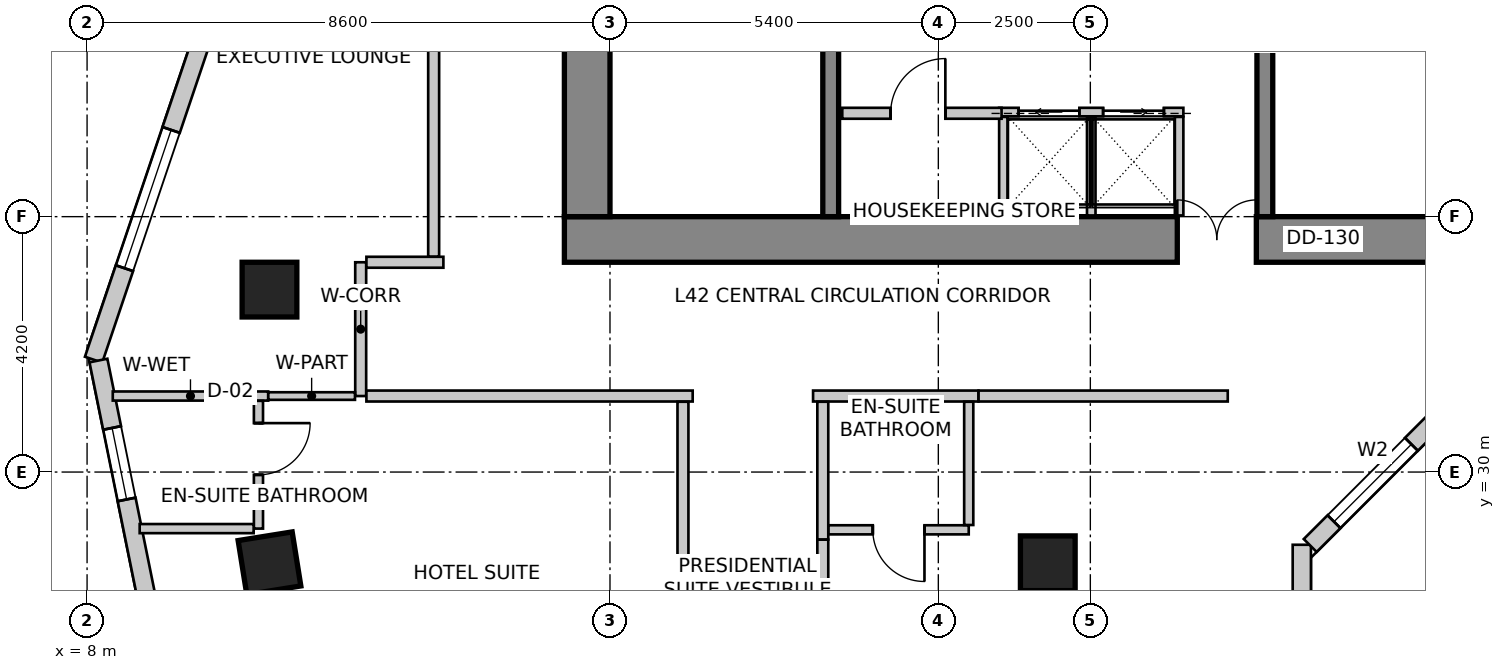
"""IFC4 building model, lengths in metres.
Left out: names, types, materials, properties, quantities, classifications, styles, units other than length and angle.
Written with IfcOpenShell. Run it as: python <this file> out.ifc"""

import sys

from ifc_helpers import new_model, si_unit, direction, frame, frame_2d, origin, origin_2d, place, context, subcontext, project, spatial, rectangle, extrude, source, transform, mapped, element, fill, save


model = new_model("IFC4")
c1 = context("Model", 3, precision=1e-05, world=origin(), true_north=direction((0.0, 1.0)))
c2 = subcontext(c1, "Body", "Model", "MODEL_VIEW")
j1 = project(units=[si_unit("LENGTHUNIT", "METRE"), si_unit("PLANEANGLEUNIT", "RADIAN")], contexts=[c1])
p1 = place(None, origin())
s1 = spatial("IfcSite", under=j1, at=p1, CompositionType="ELEMENT")
p2 = place(p1, origin())
s2 = spatial("IfcBuilding", under=s1, at=p2, CompositionType="ELEMENT")
p3 = place(p2, frame((0.0, 0.0, 168.2)))
s3 = spatial("IfcBuildingStorey", under=s2, at=p3, CompositionType="ELEMENT", Elevation=168.2)
p4 = place(p3, frame((15.85, 33.825, 0.0), z_axis=(0.0, 0.0, 1.0), x_axis=(1.0, 0.0, 0.0)))
e1 = element("IfcWall", 1, at=p4, inside=s3, PredefinedType="SHEAR", context=c2, shape_type="SweptSolid", body=[
    extrude(rectangle(XDim=15.9, YDim=0.75, at=frame_2d((7.95, 0.0))), origin(), (0.0, 0.0, 1.0), 3.6),
])
m1 = source(origin(), c2, "Body", "SweptSolid", [
    extrude(rectangle(XDim=1.3, YDim=2.15, at=frame_2d((0.65, 1.075))), frame((0.0, 0.385, 0.0), z_axis=(0.0, -1.0, 0.0), x_axis=(1.0, 0.0, 0.0)), (0.0, 0.0, 1.0), 0.77),
])
p5 = place(p4, frame((10.08, 0.0, 0.0)))
e2 = element("IfcOpeningElement", 2, at=p5, cuts=e1, PredefinedType="OPENING", context=c2, shape_type="MappedRepresentation", body=[
    mapped(m1, transform((0.0, 0.0, 0.0), scale=1.0)),
])
p6 = place(p3, frame((16.225, 34.2, 0.0), z_axis=(0.0, 0.0, 1.0), x_axis=(0.0, 1.0, 0.0)))
e3 = element("IfcWall", 3, at=p6, inside=s3, PredefinedType="SHEAR", context=c2, shape_type="SweptSolid", body=[
    extrude(rectangle(XDim=11.4, YDim=0.75, at=frame_2d((5.7, 0.0))), origin(), (0.0, 0.0, 1.0), 3.6),
])
m2 = source(origin(), c2, "Body", "SweptSolid", [
    extrude(rectangle(XDim=1.1, YDim=2.15, at=frame_2d((0.55, 1.075))), frame((0.0, 0.385, 0.0), z_axis=(0.0, -1.0, 0.0), x_axis=(1.0, 0.0, 0.0)), (0.0, 0.0, 1.0), 0.77),
])
p7 = place(p6, frame((7.15, 0.0, 0.0)))
e4 = element("IfcOpeningElement", 4, at=p7, cuts=e3, PredefinedType="OPENING", context=c2, shape_type="MappedRepresentation", body=[
    mapped(m2, transform((0.0, 0.0, 0.0), scale=1.0)),
])
p8 = place(p3, frame((20.23, 34.2, 0.0), z_axis=(0.0, 0.0, 1.0), x_axis=(0.0, 1.0, 0.0)))
e5 = element("IfcWall", 5, at=p8, inside=s3, PredefinedType="SHEAR", context=c2, shape_type="SweptSolid", body=[
    extrude(rectangle(XDim=9.06, YDim=0.26, at=frame_2d((4.53, 0.0))), origin(), (0.0, 0.0, 1.0), 3.6),
])
m3 = source(origin(), c2, "Body", "SweptSolid", [
    extrude(rectangle(XDim=1.1, YDim=2.15, at=frame_2d((0.55, 1.075))), frame((0.0, 0.14, 0.0), z_axis=(0.0, -1.0, 0.0), x_axis=(1.0, 0.0, 0.0)), (0.0, 0.0, 1.0), 0.28),
])
p9 = place(p8, frame((7.45, 0.0, 0.0)))
e6 = element("IfcOpeningElement", 6, at=p9, cuts=e5, PredefinedType="OPENING", context=c2, shape_type="MappedRepresentation", body=[
    mapped(m3, transform((0.0, 0.0, 0.0), scale=1.0)),
])
p10 = place(p3, frame((27.37, 34.2, 0.0), z_axis=(0.0, 0.0, 1.0), x_axis=(0.0, 1.0, 0.0)))
e7 = element("IfcWall", 7, at=p10, inside=s3, PredefinedType="SHEAR", context=c2, shape_type="SweptSolid", body=[
    extrude(rectangle(XDim=9.06, YDim=0.26, at=frame_2d((4.53, 0.0))), origin(), (0.0, 0.0, 1.0), 3.6),
])
p11 = place(p10, frame((7.45, 0.0, 0.0)))
e8 = element("IfcOpeningElement", 8, at=p11, cuts=e7, PredefinedType="OPENING", context=c2, shape_type="MappedRepresentation", body=[
    mapped(m3, transform((0.0, 0.0, 0.0), scale=1.0)),
])
m4 = source(origin(), c2, "Body", "SweptSolid", [
    extrude(rectangle(XDim=0.9, YDim=0.9, at=origin_2d()), origin(), (0.0, 0.0, 1.0), 3.6),
])
for number, where, z_axis, x_axis in (
    (9, (11.0, 33.0, 0.0), (0.0, 0.0, 1.0), (1.0, 0.0, 0.0)),
    (10, (11.0, 28.5, 0.0), (0.0, 0.0, 1.0), (0.158, -0.987, 0.0)),
    (11, (23.8, 28.5, 0.0), (0.0, 0.0, 1.0), (1.0, 0.0, 0.0)),
):
    element("IfcColumn", number, at=place(p3, frame(where, z_axis=z_axis, x_axis=x_axis)), inside=s3, PredefinedType="COLUMN", context=c2, shape_type="MappedRepresentation", body=[
        mapped(m4, transform((0.0, 0.0, 0.0), scale=1.0)),
    ])
p12 = place(p3, frame((27.978, 27.577, 0.0), z_axis=(0.0, 0.0, 1.0), x_axis=(0.0, 1.0, 0.0)))
e12 = element("IfcWall", 12, at=p12, inside=s3, PredefinedType="SOLIDWALL", context=c2, shape_type="SweptSolid", body=[
    extrude(rectangle(XDim=1.228, YDim=0.3, at=frame_2d((0.614, 0.0))), origin(), (0.0, 0.0, 1.0), 3.3),
])
p13 = place(p3, frame((28.116, 28.792, 0.0), z_axis=(0.0, 0.0, 1.0), x_axis=(0.707064797706, 0.707148762175, 0.0)))
e13 = element("IfcWall", 13, at=p13, inside=s3, PredefinedType="SOLIDWALL", context=c2, shape_type="SweptSolid", body=[
    extrude(rectangle(XDim=2.908, YDim=0.3, at=frame_2d((1.454, 0.0))), origin(), (0.0, 0.0, 1.0), 3.3),
])
m5 = source(origin(), c2, "Body", "SweptSolid", [
    extrude(rectangle(XDim=1.8, YDim=2.1, at=frame_2d((0.9, 1.05))), frame((0.0, 0.16, 0.0), z_axis=(0.0, -1.0, 0.0), x_axis=(1.0, 0.0, 0.0)), (0.0, 0.0, 1.0), 0.32),
])
p14 = place(p13, frame((0.554, 0.0, 0.85)))
e14 = element("IfcOpeningElement", 14, at=p14, cuts=e13, PredefinedType="OPENING", context=c2, shape_type="MappedRepresentation", body=[
    mapped(m5, transform((0.0, 0.0, 0.0), scale=1.0)),
])
p15 = place(p3, frame((13.269, 47.134, 0.0), z_axis=(0.0, 0.0, 1.0), x_axis=(-0.319929773322, -0.947441259468, 0.0)))
e15 = element("IfcWall", 15, at=p15, inside=s3, PredefinedType="SOLIDWALL", context=c2, shape_type="SweptSolid", body=[
    extrude(rectangle(XDim=16.134, YDim=0.3, at=frame_2d((8.067, 0.0))), origin(), (0.0, 0.0, 1.0), 3.3),
])
m6 = source(origin(), c2, "Body", "SweptSolid", [
    extrude(rectangle(XDim=2.4, YDim=2.2, at=frame_2d((1.2, 1.1))), frame((0.0, 0.16, 0.0), z_axis=(0.0, -1.0, 0.0), x_axis=(1.0, 0.0, 0.0)), (0.0, 0.0, 1.0), 0.32),
])
p16 = place(p15, frame((2.276, 0.0, 0.85)))
e16 = element("IfcOpeningElement", 16, at=p16, cuts=e15, PredefinedType="OPENING", context=c2, shape_type="MappedRepresentation", body=[
    mapped(m6, transform((0.0, 0.0, 0.0), scale=1.0)),
])
m7 = source(origin(), c2, "Body", "SweptSolid", [
    extrude(rectangle(XDim=2.1, YDim=2.0, at=frame_2d((1.05, 1.0))), frame((0.0, 0.16, 0.0), z_axis=(0.0, -1.0, 0.0), x_axis=(1.0, 0.0, 0.0)), (0.0, 0.0, 1.0), 0.32),
])
p17 = place(p15, frame((7.361, 0.0, 0.85)))
e17 = element("IfcOpeningElement", 17, at=p17, cuts=e15, PredefinedType="OPENING", context=c2, shape_type="MappedRepresentation", body=[
    mapped(m7, transform((0.0, 0.0, 0.0), scale=1.0)),
])
p18 = place(p15, frame((12.146, 0.0, 0.85)))
e18 = element("IfcOpeningElement", 18, at=p18, cuts=e15, PredefinedType="OPENING", context=c2, shape_type="MappedRepresentation", body=[
    mapped(m6, transform((0.0, 0.0, 0.0), scale=1.0)),
])
p19 = place(p3, frame((8.187, 31.834, 0.0), z_axis=(0.0, 0.0, 1.0), x_axis=(0.198869838988, -0.980025911464, 0.0)))
e19 = element("IfcWall", 19, at=p19, inside=s3, PredefinedType="SOLIDWALL", context=c2, shape_type="SweptSolid", body=[
    extrude(rectangle(XDim=16.363, YDim=0.3, at=frame_2d((8.182, 0.0))), origin(), (0.0, 0.0, 1.0), 3.3),
])
m8 = source(origin(), c2, "Body", "SweptSolid", [
    extrude(rectangle(XDim=1.2, YDim=1.6, at=frame_2d((0.6, 0.8))), frame((0.0, 0.16, 0.0), z_axis=(0.0, -1.0, 0.0), x_axis=(1.0, 0.0, 0.0)), (0.0, 0.0, 1.0), 0.32),
])
p20 = place(p19, frame((1.131, 0.0, 0.85)))
e20 = element("IfcOpeningElement", 20, at=p20, cuts=e19, PredefinedType="OPENING", context=c2, shape_type="MappedRepresentation", body=[
    mapped(m8, transform((0.0, 0.0, 0.0), scale=1.0)),
])
p21 = place(p19, frame((4.345, 0.0, 0.85)))
e21 = element("IfcOpeningElement", 21, at=p21, cuts=e19, PredefinedType="OPENING", context=c2, shape_type="MappedRepresentation", body=[
    mapped(m7, transform((0.0, 0.0, 0.0), scale=1.0)),
])
p22 = place(p19, frame((8.857, 0.0, 0.85)))
e22 = element("IfcOpeningElement", 22, at=p22, cuts=e19, PredefinedType="OPENING", context=c2, shape_type="MappedRepresentation", body=[
    mapped(m6, transform((0.0, 0.0, 0.0), scale=1.0)),
])
p23 = place(p19, frame((13.386, 0.0, 0.85)))
e23 = element("IfcOpeningElement", 23, at=p23, cuts=e19, PredefinedType="OPENING", context=c2, shape_type="MappedRepresentation", body=[
    mapped(m7, transform((0.0, 0.0, 0.0), scale=1.0)),
])
p24 = place(p3, frame((23.0, 35.92, 0.0), z_axis=(0.0, 0.0, 1.0), x_axis=(1.0, 0.0, 0.0)))
e24 = element("IfcWall", 24, at=p24, inside=s3, PredefinedType="SOLIDWALL", context=c2, shape_type="SweptSolid", body=[
    extrude(rectangle(XDim=3.03, YDim=0.14, at=frame_2d((1.515, 0.0))), origin(), (0.0, 0.0, 1.0), 3.3),
])
m9 = source(origin(), c2, "Body", "SweptSolid", [
    extrude(rectangle(XDim=1.0, YDim=2.15, at=frame_2d((0.5, 1.075))), frame((0.0, 0.08, 0.0), z_axis=(0.0, -1.0, 0.0), x_axis=(1.0, 0.0, 0.0)), (0.0, 0.0, 1.0), 0.16),
])
p25 = place(p24, frame((0.32, 0.0, 0.0)))
e25 = element("IfcOpeningElement", 25, at=p25, cuts=e24, PredefinedType="OPENING", context=c2, shape_type="MappedRepresentation", body=[
    mapped(m9, transform((0.0, 0.0, 0.0), scale=1.0)),
])
p26 = place(p24, frame((1.71, 0.0, 0.0)))
e26 = element("IfcOpeningElement", 26, at=p26, cuts=e24, PredefinedType="OPENING", context=c2, shape_type="MappedRepresentation", body=[
    mapped(m9, transform((0.0, 0.0, 0.0), scale=1.0)),
])
for number, where, z_axis, x_axis in (
    (27, (25.96, 34.22, 0.0), (0.0, 0.0, 1.0), (0.0, 1.0, 0.0)),
    (28, (23.07, 34.22, 0.0), (0.0, 0.0, 1.0), (0.0, 1.0, 0.0)),
    (29, (24.515, 34.22, 0.0), (0.0, 0.0, 1.0), (0.0, 1.0, 0.0)),
):
    element("IfcWall", number, at=place(p3, frame(where, z_axis=z_axis, x_axis=x_axis)), inside=s3, PredefinedType="SOLIDWALL", context=c2, shape_type="SweptSolid", body=[
        extrude(rectangle(XDim=1.62, YDim=0.14, at=frame_2d((0.81, 0.0))), origin(), (0.0, 0.0, 1.0), 2.592),
    ])
p27 = place(p3, frame((20.42, 35.9, 0.0), z_axis=(0.0, 0.0, 1.0), x_axis=(1.0, 0.0, 0.0)))
e30 = element("IfcWall", 30, at=p27, inside=s3, PredefinedType="PARTITIONING", context=c2, shape_type="SweptSolid", body=[
    extrude(rectangle(XDim=2.62, YDim=0.18, at=frame_2d((1.31, 0.0))), origin(), (0.0, 0.0, 1.0), 3.3),
])
m10 = source(origin(), c2, "Body", "SweptSolid", [
    extrude(rectangle(XDim=0.9, YDim=2.15, at=frame_2d((0.45, 1.075))), frame((0.0, 0.1, 0.0), z_axis=(0.0, -1.0, 0.0), x_axis=(1.0, 0.0, 0.0)), (0.0, 0.0, 1.0), 0.2),
])
p28 = place(p27, frame((0.796, 0.0, 0.0)))
e31 = element("IfcOpeningElement", 31, at=p28, cuts=e30, PredefinedType="OPENING", context=c2, shape_type="MappedRepresentation", body=[
    mapped(m10, transform((0.0, 0.0, 0.0), scale=1.0)),
])
p29 = place(p3, frame((12.5, 31.25, 0.0), z_axis=(0.0, 0.0, 1.0), x_axis=(0.0, 1.0, 0.0)))
e32 = element("IfcWall", 32, at=p29, inside=s3, PredefinedType="PARTITIONING", context=c2, shape_type="SweptSolid", body=[
    extrude(rectangle(XDim=2.2, YDim=0.18, at=frame_2d((1.1, 0.0))), origin(), (0.0, 0.0, 1.0), 2.885),
])
p30 = place(p3, frame((12.594, 33.45, 0.0), z_axis=(0.0, 0.0, 1.0), x_axis=(1.0, 0.0, 0.0)))
e33 = element("IfcWall", 33, at=p30, inside=s3, PredefinedType="PARTITIONING", context=c2, shape_type="SweptSolid", body=[
    extrude(rectangle(XDim=1.266, YDim=0.18, at=frame_2d((0.633, 0.0))), origin(), (0.0, 0.0, 1.0), 3.3),
])
p31 = place(p3, frame((17.96, 31.25, 0.0), z_axis=(0.0, 0.0, 1.0), x_axis=(-1.0, 0.0, 0.0)))
e34 = element("IfcWall", 34, at=p31, inside=s3, PredefinedType="PARTITIONING", context=c2, shape_type="SweptSolid", body=[
    extrude(rectangle(XDim=5.366, YDim=0.18, at=frame_2d((2.683, 0.0))), origin(), (0.0, 0.0, 1.0), 2.885),
])
p32 = place(p3, frame((22.66, 31.25, 0.0), z_axis=(0.0, 0.0, 1.0), x_axis=(-1.0, 0.0, 0.0)))
e35 = element("IfcWall", 35, at=p32, inside=s3, PredefinedType="PARTITIONING", context=c2, shape_type="SweptSolid", body=[
    extrude(rectangle(XDim=2.72, YDim=0.18, at=frame_2d((1.36, 0.0))), origin(), (0.0, 0.0, 1.0), 2.885),
])
p33 = place(p3, frame((26.76, 31.25, 0.0), z_axis=(0.0, 0.0, 1.0), x_axis=(-1.0, 0.0, 0.0)))
e36 = element("IfcWall", 36, at=p33, inside=s3, PredefinedType="PARTITIONING", context=c2, shape_type="SweptSolid", body=[
    extrude(rectangle(XDim=4.098, YDim=0.18, at=frame_2d((2.049, 0.0))), origin(), (0.0, 0.0, 1.0), 3.3),
])
p34 = place(p3, frame((13.7, 33.544, 0.0), z_axis=(0.0, 0.0, 1.0), x_axis=(0.0, 1.0, 0.0)))
e37 = element("IfcWall", 37, at=p34, inside=s3, PredefinedType="PARTITIONING", context=c2, shape_type="SweptSolid", body=[
    extrude(rectangle(XDim=13.86, YDim=0.18, at=frame_2d((6.93, 0.0))), origin(), (0.0, 0.0, 1.0), 2.442),
])
p35 = place(p34, frame((4.253, 0.0, 0.0)))
e38 = element("IfcOpeningElement", 38, at=p35, cuts=e37, PredefinedType="OPENING", context=c2, shape_type="MappedRepresentation", body=[
    mapped(m10, transform((0.0, 0.0, 0.0), scale=1.0)),
])
p36 = place(p3, frame((10.979, 31.25, 0.0), z_axis=(0.0, 0.0, 1.0), x_axis=(-1.0, 0.0, 0.0)))
e39 = element("IfcWall", 39, at=p36, inside=s3, PredefinedType="PARTITIONING", context=c2, shape_type="SweptSolid", body=[
    extrude(rectangle(XDim=2.556, YDim=0.15, at=frame_2d((1.278, 0.0))), origin(), (0.0, 0.0, 1.0), 2.442),
])
p37 = place(p3, frame((12.406, 31.25, 0.0), z_axis=(0.0, 0.0, 1.0), x_axis=(-1.0, 0.0, 0.0)))
e40 = element("IfcWall", 40, at=p37, inside=s3, PredefinedType="PARTITIONING", context=c2, shape_type="SweptSolid", body=[
    extrude(rectangle(XDim=1.426, YDim=0.125, at=frame_2d((0.713, 0.0))), origin(), (0.0, 0.0, 1.0), 2.442),
])
p38 = place(p3, frame((17.8, 19.5, 0.0), z_axis=(0.0, 0.0, 1.0), x_axis=(0.0, 1.0, 0.0)))
e41 = element("IfcWall", 41, at=p38, inside=s3, PredefinedType="PARTITIONING", context=c2, shape_type="SweptSolid", body=[
    extrude(rectangle(XDim=11.656, YDim=0.18, at=frame_2d((5.828, 0.0))), origin(), (0.0, 0.0, 1.0), 2.738),
])
p39 = place(p38, frame((5.378, 0.0, 0.0)))
e42 = element("IfcOpeningElement", 42, at=p39, cuts=e41, PredefinedType="OPENING", context=c2, shape_type="MappedRepresentation", body=[
    mapped(m10, transform((0.0, 0.0, 0.0), scale=1.0)),
])
p40 = place(p3, frame((20.1, 31.156, 0.0), z_axis=(0.0, 0.0, 1.0), x_axis=(0.0, -1.0, 0.0)))
e43 = element("IfcWall", 43, at=p40, inside=s3, PredefinedType="PARTITIONING", context=c2, shape_type="SweptSolid", body=[
    extrude(rectangle(XDim=2.266, YDim=0.18, at=frame_2d((1.133, 0.0))), origin(), (0.0, 0.0, 1.0), 2.885),
])
p41 = place(p3, frame((20.1, 28.888, 0.0), z_axis=(0.0, 0.0, 1.0), x_axis=(0.0, -1.0, 0.0)))
e44 = element("IfcWall", 44, at=p41, inside=s3, PredefinedType="PARTITIONING", context=c2, shape_type="SweptSolid", body=[
    extrude(rectangle(XDim=9.388, YDim=0.18, at=frame_2d((4.694, 0.0))), origin(), (0.0, 0.0, 1.0), 2.738),
])
p42 = place(p41, frame((4.244, 0.0, 0.0)))
e45 = element("IfcOpeningElement", 45, at=p42, cuts=e44, PredefinedType="OPENING", context=c2, shape_type="MappedRepresentation", body=[
    mapped(m10, transform((0.0, 0.0, 0.0), scale=1.0)),
])
p43 = place(p3, frame((10.819, 31.171, 0.0), z_axis=(0.0, 0.0, 1.0), x_axis=(0.0, -1.0, 0.0)))
e46 = element("IfcWall", 46, at=p43, inside=s3, PredefinedType="PARTITIONING", context=c2, shape_type="SweptSolid", body=[
    extrude(rectangle(XDim=2.101, YDim=0.15, at=frame_2d((1.05, 0.0))), origin(), (0.0, 0.0, 1.0), 2.442),
])
m11 = source(origin(), c2, "Body", "SweptSolid", [
    extrude(rectangle(XDim=0.85, YDim=2.15, at=frame_2d((0.425, 1.075))), frame((0.0, 0.085, 0.0), z_axis=(0.0, -1.0, 0.0), x_axis=(1.0, 0.0, 0.0)), (0.0, 0.0, 1.0), 0.17),
])
p44 = place(p43, frame((0.366, 0.0, 0.0)))
e47 = element("IfcOpeningElement", 47, at=p44, cuts=e46, PredefinedType="OPENING", context=c2, shape_type="MappedRepresentation", body=[
    mapped(m11, transform((0.0, 0.0, 0.0), scale=1.0)),
])
p45 = place(p3, frame((10.74, 29.07, 0.0), z_axis=(0.0, 0.0, 1.0), x_axis=(-1.0, 0.0, 0.0)))
e48 = element("IfcWall", 48, at=p45, inside=s3, PredefinedType="PARTITIONING", context=c2, shape_type="SweptSolid", body=[
    extrude(rectangle(XDim=1.875, YDim=0.15, at=frame_2d((0.937, 0.0))), origin(), (0.0, 0.0, 1.0), 3.3),
])
p46 = place(p3, frame((22.5, 29.05, 0.0), z_axis=(0.0, 0.0, 1.0), x_axis=(-1.0, 0.0, 0.0)))
e49 = element("IfcWall", 49, at=p46, inside=s3, PredefinedType="PARTITIONING", context=c2, shape_type="SweptSolid", body=[
    extrude(rectangle(XDim=2.306, YDim=0.15, at=frame_2d((1.153, 0.0))), origin(), (0.0, 0.0, 1.0), 2.885),
])
p47 = place(p46, frame((0.728, 0.0, 0.0)))
e50 = element("IfcOpeningElement", 50, at=p47, cuts=e49, PredefinedType="OPENING", context=c2, shape_type="MappedRepresentation", body=[
    mapped(m11, transform((0.0, 0.0, 0.0), scale=1.0)),
])
p48 = place(p3, frame((22.5, 31.156, 0.0), z_axis=(0.0, 0.0, 1.0), x_axis=(0.0, -1.0, 0.0)))
e51 = element("IfcWall", 51, at=p48, inside=s3, PredefinedType="PARTITIONING", context=c2, shape_type="SweptSolid", body=[
    extrude(rectangle(XDim=2.027, YDim=0.15, at=frame_2d((1.014, 0.0))), origin(), (0.0, 0.0, 1.0), 2.885),
])
m12 = source(origin(), c2, "Body", "SweptSolid", [
    extrude(rectangle(XDim=1.8, YDim=2.1, at=frame_2d((0.9, 1.05))), frame((0.0, -0.015, 0.0), z_axis=(0.0, -1.0, 0.0), x_axis=(1.0, 0.0, 0.0)), (0.0, 0.0, 1.0), 0.06),
])
p49 = place(p14, origin())
e52 = element("IfcWindow", 52, at=p49, inside=s3, PartitioningType="SINGLE_PANEL", PredefinedType="WINDOW", context=c2, shape_type="MappedRepresentation", body=[
    mapped(m12, transform((0.0, 0.0, 0.0), scale=1.0)),
])
fill(e14, e52)
m13 = source(origin(), c2, "Body", "SweptSolid", [
    extrude(rectangle(XDim=2.4, YDim=2.2, at=frame_2d((1.2, 1.1))), frame((0.0, -0.015, 0.0), z_axis=(0.0, -1.0, 0.0), x_axis=(1.0, 0.0, 0.0)), (0.0, 0.0, 1.0), 0.06),
])
p50 = place(p18, origin())
e53 = element("IfcWindow", 53, at=p50, inside=s3, PartitioningType="SINGLE_PANEL", PredefinedType="WINDOW", context=c2, shape_type="MappedRepresentation", body=[
    mapped(m13, transform((0.0, 0.0, 0.0), scale=1.0)),
])
fill(e18, e53)
m14 = source(origin(), c2, "Body", "SweptSolid", [
    extrude(rectangle(XDim=1.2, YDim=1.6, at=frame_2d((0.6, 0.8))), frame((0.0, -0.015, 0.0), z_axis=(0.0, -1.0, 0.0), x_axis=(1.0, 0.0, 0.0)), (0.0, 0.0, 1.0), 0.06),
])
p51 = place(p20, origin())
e54 = element("IfcWindow", 54, at=p51, inside=s3, PartitioningType="SINGLE_PANEL", PredefinedType="WINDOW", context=c2, shape_type="MappedRepresentation", body=[
    mapped(m14, transform((0.0, 0.0, 0.0), scale=1.0)),
])
fill(e20, e54)
m15 = source(origin(), c2, "Body", "SweptSolid", [
    extrude(rectangle(XDim=1.0, YDim=2.15, at=frame_2d((0.5, 1.075))), frame((0.0, 0.025, 0.0), z_axis=(0.0, -1.0, 0.0), x_axis=(1.0, 0.0, 0.0)), (0.0, 0.0, 1.0), 0.05),
])
p52 = place(p25, origin())
e55 = element("IfcDoor", 55, at=p52, inside=s3, OperationType="SLIDING_TO_LEFT", PredefinedType="DOOR", context=c2, shape_type="MappedRepresentation", body=[
    mapped(m15, transform((0.0, 0.0, 0.0), scale=1.0)),
])
fill(e25, e55)
p53 = place(p26, origin())
e56 = element("IfcDoor", 56, at=p53, inside=s3, OperationType="SLIDING_TO_RIGHT", PredefinedType="DOOR", context=c2, shape_type="MappedRepresentation", body=[
    mapped(m15, transform((0.0, 0.0, 0.0), scale=1.0)),
])
fill(e26, e56)
m16 = source(origin(), c2, "Body", "SweptSolid", [
    extrude(rectangle(XDim=1.3, YDim=2.15, at=frame_2d((0.65, 1.075))), frame((0.0, 0.025, 0.0), z_axis=(0.0, -1.0, 0.0), x_axis=(1.0, 0.0, 0.0)), (0.0, 0.0, 1.0), 0.05),
])
p54 = place(p5, origin())
e57 = element("IfcDoor", 57, at=p54, inside=s3, OperationType="DOUBLE_DOOR_SINGLE_SWING", PredefinedType="DOOR", context=c2, shape_type="MappedRepresentation", body=[
    mapped(m16, transform((0.0, 0.0, 0.0), scale=1.0)),
])
fill(e2, e57)
m17 = source(origin(), c2, "Body", "SweptSolid", [
    extrude(rectangle(XDim=0.9, YDim=2.15, at=frame_2d((0.45, 1.075))), frame((0.0, 0.025, 0.0), z_axis=(0.0, -1.0, 0.0), x_axis=(1.0, 0.0, 0.0)), (0.0, 0.0, 1.0), 0.05),
])
p55 = place(p28, origin())
e58 = element("IfcDoor", 58, at=p55, inside=s3, OperationType="SINGLE_SWING_RIGHT", PredefinedType="DOOR", context=c2, shape_type="MappedRepresentation", body=[
    mapped(m17, transform((0.0, 0.0, 0.0), scale=1.0)),
])
fill(e31, e58)
m18 = source(origin(), c2, "Body", "SweptSolid", [
    extrude(rectangle(XDim=0.85, YDim=2.15, at=frame_2d((0.425, 1.075))), frame((0.0, 0.025, 0.0), z_axis=(0.0, -1.0, 0.0), x_axis=(1.0, 0.0, 0.0)), (0.0, 0.0, 1.0), 0.05),
])
p56 = place(p44, origin())
e59 = element("IfcDoor", 59, at=p56, inside=s3, OperationType="SINGLE_SWING_LEFT", PredefinedType="DOOR", context=c2, shape_type="MappedRepresentation", body=[
    mapped(m18, transform((0.0, 0.0, 0.0), scale=1.0)),
])
fill(e47, e59)
p57 = place(p47, origin())
e60 = element("IfcDoor", 60, at=p57, inside=s3, OperationType="SINGLE_SWING_LEFT", PredefinedType="DOOR", context=c2, shape_type="MappedRepresentation", body=[
    mapped(m18, transform((0.0, 0.0, 0.0), scale=1.0)),
])
fill(e50, e60)
save(model, sys.argv[1])
